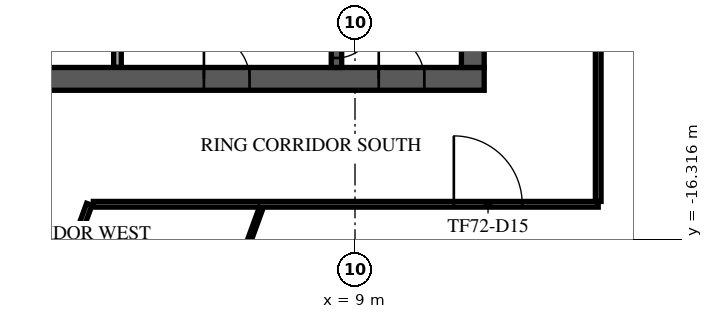
"""IFC4 building model, lengths in metres.
Left out: names, types, materials, properties, quantities, classifications, styles, units other than length and angle.
Written with IfcOpenShell. Run it as: python <this file> out.ifc"""

import sys

from ifc_helpers import new_model, si_unit, direction, frame, frame_2d, origin, place, context, subcontext, project, spatial, rectangle, extrude, element, fill, save


model = new_model("IFC4")
c1 = context("Model", 3, precision=1e-05, world=origin(), true_north=direction((0.0, 1.0)))
c2 = subcontext(c1, "Body", "Model", "MODEL_VIEW")
j1 = project(units=[si_unit("LENGTHUNIT", "METRE"), si_unit("PLANEANGLEUNIT", "RADIAN")], contexts=[c1])
p1 = place(None, origin())
s1 = spatial("IfcSite", under=j1, at=p1, CompositionType="ELEMENT")
p2 = place(p1, origin())
s2 = spatial("IfcBuilding", under=s1, at=p2, CompositionType="ELEMENT")
p3 = place(p2, frame((0.0, 0.0, 304.5)))
s3 = spatial("IfcBuildingStorey", under=s2, at=p3, CompositionType="ELEMENT", Elevation=304.5)
p4 = place(p3, frame((-12.4, -12.1, 0.0), z_axis=(0.0, 0.0, 1.0), x_axis=(1.0, 0.0, 0.0)))
e1 = element("IfcWall", 1, at=p4, inside=s3, PredefinedType="SHEAR", context=c2, shape_type="SweptSolid", body=[
    extrude(rectangle(XDim=24.8, YDim=0.6, at=frame_2d((12.4, 0.0))), origin(), (0.0, 0.0, 1.0), 3.65),
])
p5 = place(p4, frame((7.3, 0.0, 0.0)))
e2 = element("IfcOpeningElement", 2, at=p5, cuts=e1, PredefinedType="OPENING", context=c2, shape_type="SweptSolid", body=[
    extrude(rectangle(XDim=2.0, YDim=2.1, at=frame_2d((1.0, 1.05))), frame((0.0, 0.31, 0.0), z_axis=(0.0, -1.0, 0.0), x_axis=(1.0, 0.0, 0.0)), (0.0, 0.0, 1.0), 0.62),
])
p6 = place(p4, frame((17.425, 0.0, 0.0)))
e3 = element("IfcOpeningElement", 3, at=p6, cuts=e1, PredefinedType="OPENING", context=c2, shape_type="SweptSolid", body=[
    extrude(rectangle(XDim=1.2, YDim=2.1, at=frame_2d((0.6, 1.05))), frame((0.0, 0.31, 0.0), z_axis=(0.0, -1.0, 0.0), x_axis=(1.0, 0.0, 0.0)), (0.0, 0.0, 1.0), 0.62),
])
p7 = place(p4, frame((1.575, 0.0, 0.0)))
e4 = element("IfcOpeningElement", 4, at=p7, cuts=e1, PredefinedType="OPENING", context=c2, shape_type="SweptSolid", body=[
    extrude(rectangle(XDim=1.2, YDim=2.1, at=frame_2d((0.6, 1.05))), frame((0.0, 0.31, 0.0), z_axis=(0.0, -1.0, 0.0), x_axis=(1.0, 0.0, 0.0)), (0.0, 0.0, 1.0), 0.62),
])
p8 = place(p4, frame((22.025, 0.0, 0.0)))
e5 = element("IfcOpeningElement", 5, at=p8, cuts=e1, PredefinedType="OPENING", context=c2, shape_type="SweptSolid", body=[
    extrude(rectangle(XDim=1.2, YDim=2.1, at=frame_2d((0.6, 1.05))), frame((0.0, 0.31, 0.0), z_axis=(0.0, -1.0, 0.0), x_axis=(1.0, 0.0, 0.0)), (0.0, 0.0, 1.0), 0.62),
])
p9 = place(p3, frame((12.1, -11.8, 0.0), z_axis=(0.0, 0.0, 1.0), x_axis=(0.0, 1.0, 0.0)))
e6 = element("IfcWall", 6, at=p9, inside=s3, PredefinedType="SHEAR", context=c2, shape_type="SweptSolid", body=[
    extrude(rectangle(XDim=23.6, YDim=0.6, at=frame_2d((11.8, 0.0))), origin(), (0.0, 0.0, 1.0), 3.65),
])
p10 = place(p9, frame((10.6, 0.0, 0.0)))
e7 = element("IfcOpeningElement", 7, at=p10, cuts=e6, PredefinedType="OPENING", context=c2, shape_type="SweptSolid", body=[
    extrude(rectangle(XDim=2.4, YDim=2.4, at=frame_2d((1.2, 1.2))), frame((0.0, 0.31, 0.0), z_axis=(0.0, -1.0, 0.0), x_axis=(1.0, 0.0, 0.0)), (0.0, 0.0, 1.0), 0.62),
])
p11 = place(p3, frame((8.512, -4.55, 0.0), z_axis=(0.0, 0.0, 1.0), x_axis=(0.0, -1.0, 0.0)))
e8 = element("IfcWall", 8, at=p11, inside=s3, PredefinedType="SOLIDWALL", context=c2, shape_type="SweptSolid", body=[
    extrude(rectangle(XDim=7.25, YDim=0.275, at=frame_2d((3.625, 0.0))), origin(), (0.0, 0.0, 1.0), 3.65),
])
p12 = place(p11, frame((6.0, 0.0, 0.0)))
e9 = element("IfcOpeningElement", 9, at=p12, cuts=e8, PredefinedType="OPENING", context=c2, shape_type="SweptSolid", body=[
    extrude(rectangle(XDim=1.0, YDim=2.1, at=frame_2d((0.5, 1.05))), frame((0.0, 0.147, 0.0), z_axis=(0.0, -1.0, 0.0), x_axis=(1.0, 0.0, 0.0)), (0.0, 0.0, 1.0), 0.295),
])
p13 = place(p3, frame((2.75, -11.795, 0.0), z_axis=(0.0, 0.0, 1.0), x_axis=(0.0, 1.0, 0.0)))
e10 = element("IfcWall", 10, at=p13, inside=s3, PredefinedType="PARTITIONING", context=c2, shape_type="SweptSolid", body=[
    extrude(rectangle(XDim=2.99, YDim=0.2, at=frame_2d((1.495, 0.0))), origin(), (0.0, 0.0, 1.0), 3.65),
])
p14 = place(p3, frame((-24.679, -11.445, 0.0), z_axis=(0.0, 0.0, 1.0), x_axis=(0.939685239834, -0.342040421645, 0.0)))
e11 = element("IfcWall", 11, at=p14, inside=s3, PredefinedType="PARTITIONING", context=c2, shape_type="SweptSolid", body=[
    extrude(rectangle(XDim=38.628, YDim=0.15, at=frame_2d((19.314, 0.0))), origin(), (0.0, 0.0, 1.0), 3.25),
])
p15 = place(p14, frame((8.764, 0.0, 0.0)))
e12 = element("IfcOpeningElement", 12, at=p15, cuts=e11, PredefinedType="OPENING", context=c2, shape_type="SweptSolid", body=[
    extrude(rectangle(XDim=1.0, YDim=2.1, at=frame_2d((0.5, 1.05))), frame((0.0, 0.085, 0.0), z_axis=(0.0, -1.0, 0.0), x_axis=(1.0, 0.0, 0.0)), (0.0, 0.0, 1.0), 0.17),
])
p16 = place(p14, frame((19.503, 0.0, 0.0)))
e13 = element("IfcOpeningElement", 13, at=p16, cuts=e11, PredefinedType="OPENING", context=c2, shape_type="SweptSolid", body=[
    extrude(rectangle(XDim=1.0, YDim=2.1, at=frame_2d((0.5, 1.05))), frame((0.0, 0.085, 0.0), z_axis=(0.0, -1.0, 0.0), x_axis=(1.0, 0.0, 0.0)), (0.0, 0.0, 1.0), 0.17),
])
p17 = place(p14, frame((29.163, 0.0, 0.0)))
e14 = element("IfcOpeningElement", 14, at=p17, cuts=e11, PredefinedType="OPENING", context=c2, shape_type="SweptSolid", body=[
    extrude(rectangle(XDim=1.0, YDim=2.1, at=frame_2d((0.5, 1.05))), frame((0.0, 0.085, 0.0), z_axis=(0.0, -1.0, 0.0), x_axis=(1.0, 0.0, 0.0)), (0.0, 0.0, 1.0), 0.17),
])
p18 = place(p3, frame((1.004, -18.159, 0.0), z_axis=(0.0, 0.0, 1.0), x_axis=(0.342023405877, 0.939691433308, 0.0)))
e15 = element("IfcWall", 15, at=p18, inside=s3, PredefinedType="PARTITIONING", context=c2, shape_type="SweptSolid", body=[
    extrude(rectangle(XDim=2.937, YDim=0.15, at=frame_2d((1.468, 0.0))), origin(), (0.0, 0.0, 1.0), 3.65),
])
p19 = place(p3, frame((2.115, -15.4, 0.0), z_axis=(0.0, 0.0, 1.0), x_axis=(1.0, 0.0, 0.0)))
e16 = element("IfcWall", 16, at=p19, inside=s3, PredefinedType="PARTITIONING", context=c2, shape_type="SweptSolid", body=[
    extrude(rectangle(XDim=13.285, YDim=0.15, at=frame_2d((6.643, 0.0))), origin(), (0.0, 0.0, 1.0), 3.25),
])
p20 = place(p19, frame((9.486, 0.0, 0.0)))
e17 = element("IfcOpeningElement", 17, at=p20, cuts=e16, PredefinedType="OPENING", context=c2, shape_type="SweptSolid", body=[
    extrude(rectangle(XDim=1.8, YDim=2.1, at=frame_2d((0.9, 1.05))), frame((0.0, 0.085, 0.0), z_axis=(0.0, -1.0, 0.0), x_axis=(1.0, 0.0, 0.0)), (0.0, 0.0, 1.0), 0.17),
])
p21 = place(p3, frame((15.4, -15.325, 0.0), z_axis=(0.0, 0.0, 1.0), x_axis=(0.0, 1.0, 0.0)))
e18 = element("IfcWall", 18, at=p21, inside=s3, PredefinedType="PARTITIONING", context=c2, shape_type="SweptSolid", body=[
    extrude(rectangle(XDim=27.593, YDim=0.15, at=frame_2d((13.796, 0.0))), origin(), (0.0, 0.0, 1.0), 3.25),
])
p22 = place(p21, frame((5.267, 0.0, 0.0)))
e19 = element("IfcOpeningElement", 19, at=p22, cuts=e18, PredefinedType="OPENING", context=c2, shape_type="SweptSolid", body=[
    extrude(rectangle(XDim=1.0, YDim=2.1, at=frame_2d((0.5, 1.05))), frame((0.0, 0.085, 0.0), z_axis=(0.0, -1.0, 0.0), x_axis=(1.0, 0.0, 0.0)), (0.0, 0.0, 1.0), 0.17),
])
p23 = place(p21, frame((16.072, 0.0, 0.0)))
e20 = element("IfcOpeningElement", 20, at=p23, cuts=e18, PredefinedType="OPENING", context=c2, shape_type="SweptSolid", body=[
    extrude(rectangle(XDim=1.0, YDim=2.1, at=frame_2d((0.5, 1.05))), frame((0.0, 0.085, 0.0), z_axis=(0.0, -1.0, 0.0), x_axis=(1.0, 0.0, 0.0)), (0.0, 0.0, 1.0), 0.17),
])
p24 = place(p21, frame((21.944, 0.0, 0.0)))
e21 = element("IfcOpeningElement", 21, at=p24, cuts=e18, PredefinedType="OPENING", context=c2, shape_type="SweptSolid", body=[
    extrude(rectangle(XDim=1.8, YDim=2.1, at=frame_2d((0.9, 1.05))), frame((0.0, 0.085, 0.0), z_axis=(0.0, -1.0, 0.0), x_axis=(1.0, 0.0, 0.0)), (0.0, 0.0, 1.0), 0.17),
])
p25 = place(p3, frame((5.028, -19.624, 0.0), z_axis=(0.0, 0.0, 1.0), x_axis=(0.342064062603, 0.939676634314, 0.0)))
e22 = element("IfcWall", 22, at=p25, inside=s3, PredefinedType="PARTITIONING", context=c2, shape_type="SweptSolid", body=[
    extrude(rectangle(XDim=4.396, YDim=0.1, at=frame_2d((2.198, 0.0))), origin(), (0.0, 0.0, 1.0), 3.65),
])
p26 = place(p6, origin())
e23 = element("IfcDoor", 23, at=p26, inside=s3, OperationType="SINGLE_SWING_LEFT", PredefinedType="DOOR", context=c2, shape_type="SweptSolid", body=[
    extrude(rectangle(XDim=1.2, YDim=2.1, at=frame_2d((0.6, 1.05))), frame((0.0, 0.025, 0.0), z_axis=(0.0, -1.0, 0.0), x_axis=(1.0, 0.0, 0.0)), (0.0, 0.0, 1.0), 0.05),
])
fill(e3, e23)
p27 = place(p8, origin())
e24 = element("IfcDoor", 24, at=p27, inside=s3, OperationType="SINGLE_SWING_LEFT", PredefinedType="DOOR", context=c2, shape_type="SweptSolid", body=[
    extrude(rectangle(XDim=1.2, YDim=2.1, at=frame_2d((0.6, 1.05))), frame((0.0, 0.025, 0.0), z_axis=(0.0, -1.0, 0.0), x_axis=(1.0, 0.0, 0.0)), (0.0, 0.0, 1.0), 0.05),
])
fill(e5, e24)
p28 = place(p12, origin())
e25 = element("IfcDoor", 25, at=p28, inside=s3, OperationType="SINGLE_SWING_LEFT", PredefinedType="DOOR", context=c2, shape_type="SweptSolid", body=[
    extrude(rectangle(XDim=1.0, YDim=2.1, at=frame_2d((0.5, 1.05))), frame((0.0, 0.025, 0.0), z_axis=(0.0, -1.0, 0.0), x_axis=(1.0, 0.0, 0.0)), (0.0, 0.0, 1.0), 0.05),
])
fill(e9, e25)
p29 = place(p20, frame((1.8, 0.0, 0.0), z_axis=(0.0, 0.0, 1.0), x_axis=(-1.0, 0.0, 0.0)))
e26 = element("IfcDoor", 26, at=p29, inside=s3, OperationType="DOUBLE_DOOR_SINGLE_SWING", PredefinedType="DOOR", context=c2, shape_type="SweptSolid", body=[
    extrude(rectangle(XDim=1.8, YDim=2.1, at=frame_2d((0.9, 1.05))), frame((0.0, 0.025, 0.0), z_axis=(0.0, -1.0, 0.0), x_axis=(1.0, 0.0, 0.0)), (0.0, 0.0, 1.0), 0.05),
])
fill(e17, e26)
save(model, sys.argv[1])
